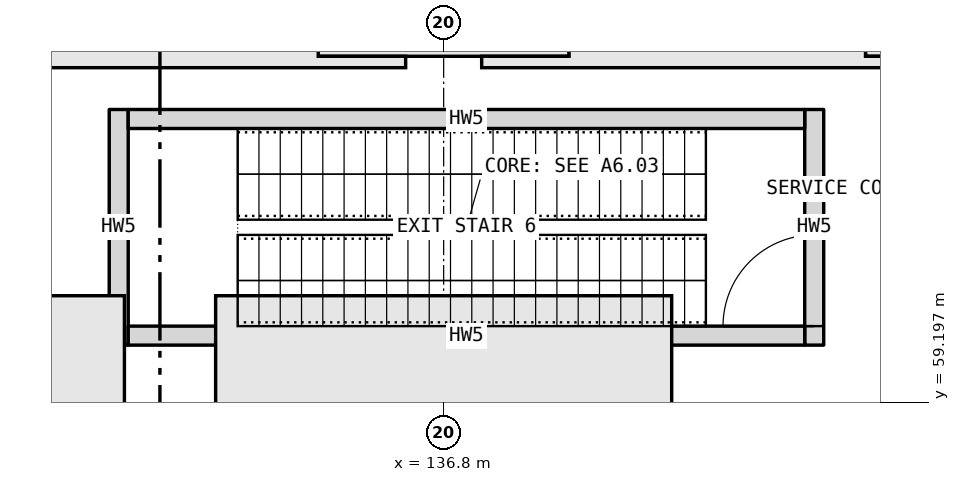
"""IFC4 building model, lengths in metres.
Left out: names, types, materials, properties, quantities, classifications, styles, units other than length and angle.
Written with IfcOpenShell. Run it as: python <this file> out.ifc"""

import sys

from ifc_helpers import new_model, si_unit, direction, frame, frame_2d, origin, place, context, subcontext, project, spatial, rectangle, extrude, element, fill, save


model = new_model("IFC4")
c1 = context("Model", 3, precision=1e-05, world=origin(), true_north=direction((0.0, 1.0)))
c2 = subcontext(c1, "Body", "Model", "MODEL_VIEW")
j1 = project(units=[si_unit("LENGTHUNIT", "METRE"), si_unit("PLANEANGLEUNIT", "RADIAN")], contexts=[c1])
p1 = place(None, origin())
s1 = spatial("IfcSite", under=j1, at=p1, CompositionType="ELEMENT")
p2 = place(p1, origin())
s2 = spatial("IfcBuilding", under=s1, at=p2, CompositionType="ELEMENT")
p3 = place(p2, frame((0.0, 0.0, -8.0)))
s3 = spatial("IfcBuildingStorey", under=s2, at=p3, CompositionType="ELEMENT", Elevation=-8.0)
p4 = place(p3, frame((132.525, 59.95, 0.0), z_axis=(0.0, 0.0, 1.0), x_axis=(0.0, 1.0, 0.0)))
e1 = element("IfcWall", 1, at=p4, inside=s3, PredefinedType="SOLIDWALL", context=c2, shape_type="SweptSolid", body=[
    extrude(rectangle(XDim=3.1, YDim=0.25, at=frame_2d((1.55, 0.0))), origin(), (0.0, 0.0, 1.0), 7.595),
])
p5 = place(p3, frame((141.675, 59.95, 0.0), z_axis=(0.0, 0.0, 1.0), x_axis=(0.0, 1.0, 0.0)))
e2 = element("IfcWall", 2, at=p5, inside=s3, PredefinedType="SOLIDWALL", context=c2, shape_type="SweptSolid", body=[
    extrude(rectangle(XDim=3.1, YDim=0.25, at=frame_2d((1.55, 0.0))), origin(), (0.0, 0.0, 1.0), 7.595),
])
p6 = place(p5, frame((0.25, 0.0, 0.0)))
e3 = element("IfcOpeningElement", 3, at=p6, cuts=e2, PredefinedType="OPENING", context=c2, shape_type="SweptSolid", body=[
    extrude(rectangle(XDim=1.2, YDim=2.1, at=frame_2d((0.6, 1.05))), frame((0.0, 0.135, 0.0), z_axis=(0.0, -1.0, 0.0), x_axis=(1.0, 0.0, 0.0)), (0.0, 0.0, 1.0), 0.27),
])
for number, where, z_axis, x_axis in (
    (4, (132.65, 60.075, 0.0), (0.0, 0.0, 1.0), (1.0, 0.0, 0.0)),
    (5, (132.65, 62.925, 0.0), (0.0, 0.0, 1.0), (1.0, 0.0, 0.0)),
):
    element("IfcWall", number, at=place(p3, frame(where, z_axis=z_axis, x_axis=x_axis)), inside=s3, PredefinedType="SOLIDWALL", context=c2, shape_type="SweptSolid", body=[
        extrude(rectangle(XDim=8.9, YDim=0.25, at=frame_2d((4.45, 0.0))), origin(), (0.0, 0.0, 1.0), 7.595),
    ])
p7 = place(p6, origin())
e6 = element("IfcDoor", 6, at=p7, inside=s3, OperationType="SINGLE_SWING_LEFT", PredefinedType="DOOR", context=c2, shape_type="SweptSolid", body=[
    extrude(rectangle(XDim=1.2, YDim=2.1, at=frame_2d((0.6, 1.05))), frame((0.0, 0.025, 0.0), z_axis=(0.0, -1.0, 0.0), x_axis=(1.0, 0.0, 0.0)), (0.0, 0.0, 1.0), 0.05),
])
fill(e3, e6)
save(model, sys.argv[1])
